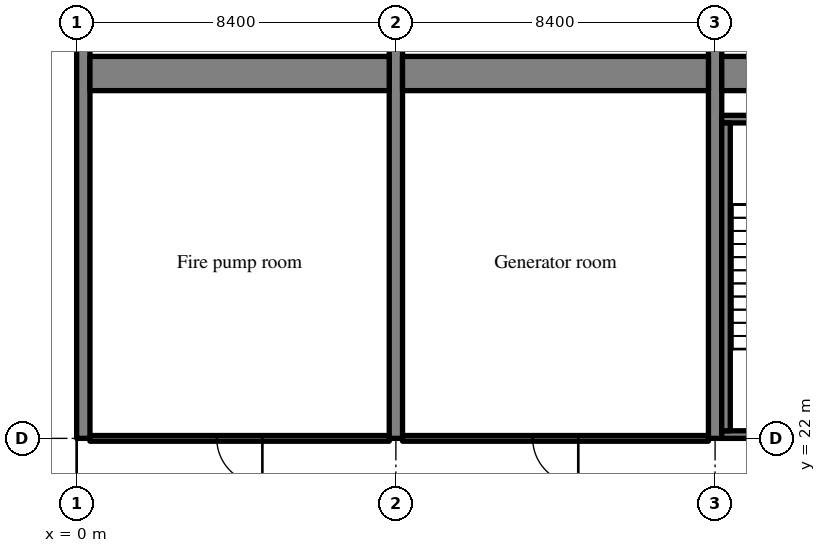
"""IFC4 building model, lengths in metres.
Left out: names, types, materials, properties, quantities, classifications, styles, units other than length and angle.
Written with IfcOpenShell. Run it as: python <this file> out.ifc"""

import sys

from ifc_helpers import new_model, si_unit, direction, frame, frame_2d, origin, place, context, subcontext, project, spatial, rectangle, extrude, source, transform, mapped, element, fill, save


model = new_model("IFC4")
c1 = context("Model", 3, precision=1e-05, world=origin(), true_north=direction((0.0, 1.0)))
c2 = subcontext(c1, "Body", "Model", "MODEL_VIEW")
j1 = project(units=[si_unit("LENGTHUNIT", "METRE"), si_unit("PLANEANGLEUNIT", "RADIAN")], contexts=[c1])
p1 = place(None, origin())
s1 = spatial("IfcSite", under=j1, at=p1, CompositionType="ELEMENT")
p2 = place(p1, origin())
s2 = spatial("IfcBuilding", under=s1, at=p2, CompositionType="ELEMENT")
p3 = place(p2, frame((0.0, 0.0, 140.8)))
s3 = spatial("IfcBuildingStorey", under=s2, at=p3, CompositionType="ELEMENT", Elevation=140.8)
m1 = source(origin(), c2, "Body", "SweptSolid", [
    extrude(rectangle(XDim=16.0, YDim=0.35, at=frame_2d((8.0, 0.0))), origin(), (0.0, 0.0, 1.0), 5.12),
])
p4 = place(p3, frame((0.175, 22.0, 0.0), z_axis=(0.0, 0.0, 1.0), x_axis=(0.0, 1.0, 0.0)))
e1 = element("IfcWall", 1, at=p4, inside=s3, PredefinedType="SHEAR", context=c2, shape_type="MappedRepresentation", body=[
    mapped(m1, transform((0.0, 0.0, 0.0), scale=1.0)),
])
m2 = source(origin(), c2, "Body", "SweptSolid", [
    extrude(rectangle(XDim=20.0, YDim=0.35, at=frame_2d((10.0, 0.0))), origin(), (0.0, 0.0, 1.0), 5.12),
])
p5 = place(p3, frame((8.4, 22.0, 0.0), z_axis=(0.0, 0.0, 1.0), x_axis=(0.0, 1.0, 0.0)))
e2 = element("IfcWall", 2, at=p5, inside=s3, PredefinedType="SHEAR", context=c2, shape_type="MappedRepresentation", body=[
    mapped(m2, transform((0.0, 0.0, 0.0), scale=1.0)),
])
m3 = source(origin(), c2, "Body", "SweptSolid", [
    extrude(rectangle(XDim=1.2, YDim=2.1, at=frame_2d((0.6, 1.05))), frame((0.0, 0.185, 0.0), z_axis=(0.0, -1.0, 0.0), x_axis=(1.0, 0.0, 0.0)), (0.0, 0.0, 1.0), 0.37),
])
p6 = place(p5, frame((13.4, 0.0, 0.0)))
e3 = element("IfcOpeningElement", 3, at=p6, cuts=e2, PredefinedType="OPENING", context=c2, shape_type="MappedRepresentation", body=[
    mapped(m3, transform((0.0, 0.0, 0.0), scale=1.0)),
])
p7 = place(p3, frame((16.8, 22.0, 0.0), z_axis=(0.0, 0.0, 1.0), x_axis=(0.0, 1.0, 0.0)))
e4 = element("IfcWall", 4, at=p7, inside=s3, PredefinedType="SHEAR", context=c2, shape_type="MappedRepresentation", body=[
    mapped(m2, transform((0.0, 0.0, 0.0), scale=1.0)),
])
p8 = place(p7, frame((13.4, 0.0, 0.0)))
e5 = element("IfcOpeningElement", 5, at=p8, cuts=e4, PredefinedType="OPENING", context=c2, shape_type="MappedRepresentation", body=[
    mapped(m3, transform((0.0, 0.0, 0.0), scale=1.0)),
])
m4 = source(origin(), c2, "Body", "SweptSolid", [
    extrude(rectangle(XDim=7.875, YDim=0.9, at=frame_2d((3.938, 0.0))), origin(), (0.0, 0.0, 1.0), 5.12),
])
p9 = place(p3, frame((0.35, 31.6, 0.0), z_axis=(0.0, 0.0, 1.0), x_axis=(1.0, 0.0, 0.0)))
e6 = element("IfcWall", 6, at=p9, inside=s3, PredefinedType="SHEAR", context=c2, shape_type="MappedRepresentation", body=[
    mapped(m4, transform((0.0, 0.0, 0.0), scale=1.0)),
])
m5 = source(origin(), c2, "Body", "SweptSolid", [
    extrude(rectangle(XDim=8.05, YDim=0.9, at=frame_2d((4.025, 0.0))), origin(), (0.0, 0.0, 1.0), 5.12),
])
p10 = place(p3, frame((8.575, 31.6, 0.0), z_axis=(0.0, 0.0, 1.0), x_axis=(1.0, 0.0, 0.0)))
e7 = element("IfcWall", 7, at=p10, inside=s3, PredefinedType="SHEAR", context=c2, shape_type="MappedRepresentation", body=[
    mapped(m5, transform((0.0, 0.0, 0.0), scale=1.0)),
])
m6 = source(origin(), c2, "Body", "SweptSolid", [
    extrude(rectangle(XDim=8.225, YDim=0.9, at=frame_2d((4.112, 0.0))), origin(), (0.0, 0.0, 1.0), 5.12),
])
p11 = place(p3, frame((16.975, 31.6, 0.0), z_axis=(0.0, 0.0, 1.0), x_axis=(1.0, 0.0, 0.0)))
e8 = element("IfcWall", 8, at=p11, inside=s3, PredefinedType="SHEAR", context=c2, shape_type="MappedRepresentation", body=[
    mapped(m6, transform((0.0, 0.0, 0.0), scale=1.0)),
])
m7 = source(origin(), c2, "Body", "SweptSolid", [
    extrude(rectangle(XDim=8.225, YDim=0.2, at=frame_2d((4.112, 0.0))), origin(), (0.0, 0.0, 1.0), 5.12),
])
p12 = place(p3, frame((16.975, 22.1, 0.0), z_axis=(0.0, 0.0, 1.0), x_axis=(1.0, 0.0, 0.0)))
e9 = element("IfcWall", 9, at=p12, inside=s3, PredefinedType="SOLIDWALL", context=c2, shape_type="MappedRepresentation", body=[
    mapped(m7, transform((0.0, 0.0, 0.0), scale=1.0)),
])
m8 = source(origin(), c2, "Body", "SweptSolid", [
    extrude(rectangle(XDim=1.2, YDim=2.1, at=frame_2d((0.6, 1.05))), frame((0.0, 0.11, 0.0), z_axis=(0.0, -1.0, 0.0), x_axis=(1.0, 0.0, 0.0)), (0.0, 0.0, 1.0), 0.22),
])
p13 = place(p12, frame((6.025, 0.0, 0.0)))
e10 = element("IfcOpeningElement", 10, at=p13, cuts=e9, PredefinedType="OPENING", context=c2, shape_type="MappedRepresentation", body=[
    mapped(m8, transform((0.0, 0.0, 0.0), scale=1.0)),
])
p14 = place(p3, frame((25.2, 30.4, 0.0), z_axis=(0.0, 0.0, 1.0), x_axis=(-1.0, 0.0, 0.0)))
e11 = element("IfcWall", 11, at=p14, inside=s3, PredefinedType="SOLIDWALL", context=c2, shape_type="MappedRepresentation", body=[
    mapped(m7, transform((0.0, 0.0, 0.0), scale=1.0)),
])
m9 = source(origin(), c2, "Body", "SweptSolid", [
    extrude(rectangle(XDim=1.0, YDim=2.1, at=frame_2d((0.5, 1.05))), frame((0.0, 0.11, 0.0), z_axis=(0.0, -1.0, 0.0), x_axis=(1.0, 0.0, 0.0)), (0.0, 0.0, 1.0), 0.22),
])
p15 = place(p14, frame((1.1, 0.0, 0.0)))
e12 = element("IfcOpeningElement", 12, at=p15, cuts=e11, PredefinedType="OPENING", context=c2, shape_type="MappedRepresentation", body=[
    mapped(m9, transform((0.0, 0.0, 0.0), scale=1.0)),
])
m10 = source(origin(), c2, "Body", "SweptSolid", [
    extrude(rectangle(XDim=8.1, YDim=0.225, at=frame_2d((4.05, 0.0))), origin(), (0.0, 0.0, 1.0), 5.12),
])
p16 = place(p3, frame((17.087, 22.2, 0.0), z_axis=(0.0, 0.0, 1.0), x_axis=(0.0, 1.0, 0.0)))
e13 = element("IfcWall", 13, at=p16, inside=s3, PredefinedType="SOLIDWALL", context=c2, shape_type="MappedRepresentation", body=[
    mapped(m10, transform((0.0, 0.0, 0.0), scale=1.0)),
])
m11 = source(origin(), c2, "Body", "SweptSolid", [
    extrude(rectangle(XDim=7.875, YDim=0.15, at=frame_2d((3.938, 0.0))), origin(), (0.0, 0.0, 1.0), 4.37),
])
p17 = place(p3, frame((0.35, 22.0, 0.0), z_axis=(0.0, 0.0, 1.0), x_axis=(1.0, 0.0, 0.0)))
e14 = element("IfcWall", 14, at=p17, inside=s3, PredefinedType="PARTITIONING", context=c2, shape_type="MappedRepresentation", body=[
    mapped(m11, transform((0.0, 0.0, 0.0), scale=1.0)),
])
m12 = source(origin(), c2, "Body", "SweptSolid", [
    extrude(rectangle(XDim=1.2, YDim=2.1, at=frame_2d((0.6, 1.05))), frame((0.0, 0.085, 0.0), z_axis=(0.0, -1.0, 0.0), x_axis=(1.0, 0.0, 0.0)), (0.0, 0.0, 1.0), 0.17),
])
p18 = place(p17, frame((3.337, 0.0, 0.0)))
e15 = element("IfcOpeningElement", 15, at=p18, cuts=e14, PredefinedType="OPENING", context=c2, shape_type="MappedRepresentation", body=[
    mapped(m12, transform((0.0, 0.0, 0.0), scale=1.0)),
])
m13 = source(origin(), c2, "Body", "SweptSolid", [
    extrude(rectangle(XDim=8.05, YDim=0.15, at=frame_2d((4.025, 0.0))), origin(), (0.0, 0.0, 1.0), 4.37),
])
p19 = place(p3, frame((8.575, 22.0, 0.0), z_axis=(0.0, 0.0, 1.0), x_axis=(1.0, 0.0, 0.0)))
e16 = element("IfcWall", 16, at=p19, inside=s3, PredefinedType="PARTITIONING", context=c2, shape_type="MappedRepresentation", body=[
    mapped(m13, transform((0.0, 0.0, 0.0), scale=1.0)),
])
p20 = place(p19, frame((3.425, 0.0, 0.0)))
e17 = element("IfcOpeningElement", 17, at=p20, cuts=e16, PredefinedType="OPENING", context=c2, shape_type="MappedRepresentation", body=[
    mapped(m12, transform((0.0, 0.0, 0.0), scale=1.0)),
])
m14 = source(origin(), c2, "Body", "SweptSolid", [
    extrude(rectangle(XDim=1.2, YDim=2.1, at=frame_2d((0.6, 1.05))), frame((0.0, 0.025, 0.0), z_axis=(0.0, -1.0, 0.0), x_axis=(1.0, 0.0, 0.0)), (0.0, 0.0, 1.0), 0.05),
])
p21 = place(p18, origin())
e18 = element("IfcDoor", 18, at=p21, inside=s3, OperationType="SINGLE_SWING_RIGHT", PredefinedType="DOOR", context=c2, shape_type="MappedRepresentation", body=[
    mapped(m14, transform((0.0, 0.0, 0.0), scale=1.0)),
])
fill(e15, e18)
p22 = place(p20, origin())
e19 = element("IfcDoor", 19, at=p22, inside=s3, OperationType="SINGLE_SWING_RIGHT", PredefinedType="DOOR", context=c2, shape_type="MappedRepresentation", body=[
    mapped(m14, transform((0.0, 0.0, 0.0), scale=1.0)),
])
fill(e17, e19)
save(model, sys.argv[1])
